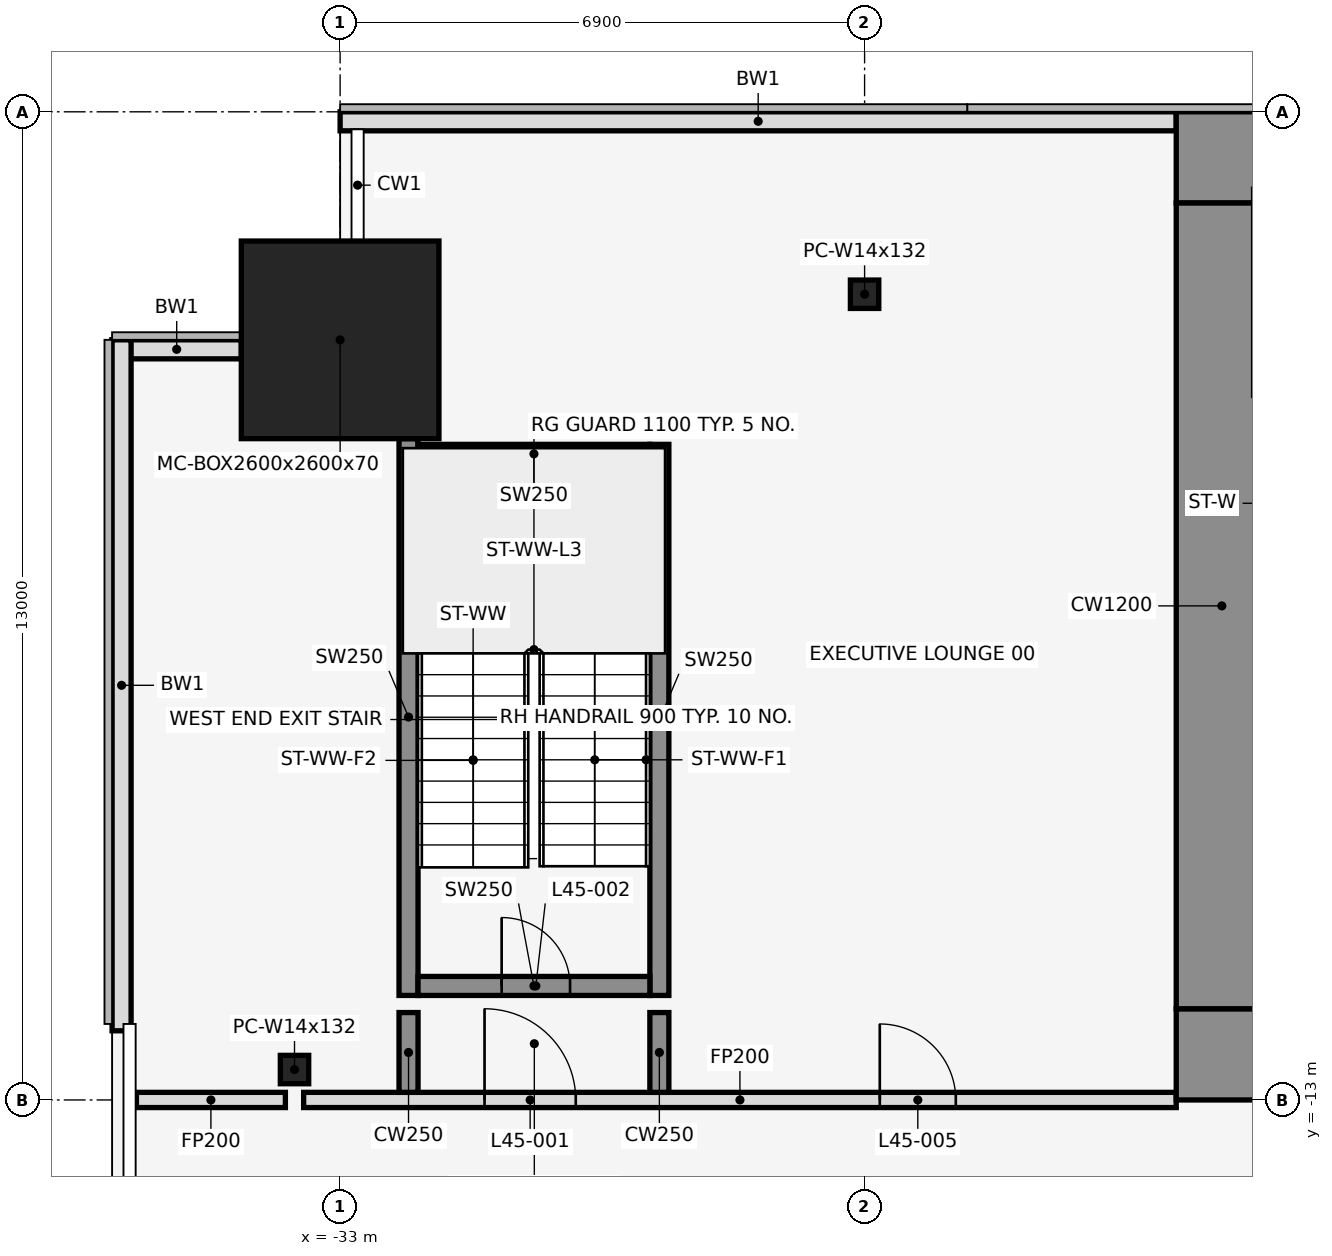
"""IFC4 building model, lengths in metres.
Left out: names, types, materials, properties, quantities, classifications, styles, units other than length and angle.
Written with IfcOpenShell. Run it as: python <this file> out.ifc"""

import sys

from ifc_helpers import new_model, si_unit, direction, frame, frame_2d, origin, origin_2d, place, context, subcontext, project, spatial, rectangle, hollow_rectangle, i_section, extrude, element, fill, save


model = new_model("IFC4")
c1 = context("Model", 3, precision=1e-05, world=origin(), true_north=direction((0.0, 1.0)))
c2 = subcontext(c1, "Body", "Model", "MODEL_VIEW")
j1 = project(units=[si_unit("LENGTHUNIT", "METRE"), si_unit("PLANEANGLEUNIT", "RADIAN")], contexts=[c1])
p1 = place(None, origin())
s1 = spatial("IfcSite", under=j1, at=p1, CompositionType="ELEMENT")
p2 = place(p1, origin())
s2 = spatial("IfcBuilding", under=s1, at=p2, CompositionType="ELEMENT")
p3 = place(p2, frame((0.0, 0.0, 203.2)))
s3 = spatial("IfcBuildingStorey", under=s2, at=p3, CompositionType="ELEMENT", Elevation=203.2)
p4 = place(p3, frame((-33.0, -3.0, 0.0), z_axis=(0.0, 0.0, 1.0), x_axis=(1.0, 0.0, 0.0)))
e1 = element("IfcColumn", 1, at=p4, inside=s3, PredefinedType="COLUMN", context=c2, shape_type="SweptSolid", body=[
    extrude(hollow_rectangle(XDim=2.6, YDim=2.6, WallThickness=0.07, at=origin_2d()), origin(), (0.0, 0.0, 1.0), 4.1),
])
for number, where, z_axis, x_axis in (
    (2, (-26.1, -2.4, 0.0), (0.0, 0.0, 1.0), (1.0, 0.0, 0.0)),
    (3, (-33.6, -12.6, 0.0), (0.0, 0.0, 1.0), (1.0, 0.0, 0.0)),
):
    element("IfcColumn", number, at=place(p3, frame(where, z_axis=z_axis, x_axis=x_axis)), inside=s3, PredefinedType="COLUMN", context=c2, shape_type="SweptSolid", body=[
        extrude(i_section(OverallWidth=0.373, OverallDepth=0.373, WebThickness=0.016, FlangeThickness=0.026, at=origin_2d()), origin(), (0.0, 0.0, 1.0), 4.1),
    ])
p5 = place(p3, frame((-22.0, -0.125, 0.0), z_axis=(0.0, 0.0, 1.0), x_axis=(-1.0, 0.0, 0.0)))
e4 = element("IfcWall", 4, at=p5, inside=s3, PredefinedType="STANDARD", context=c2, shape_type="SweptSolid", body=[
    extrude(rectangle(XDim=11.0, YDim=0.25, at=frame_2d((5.5, 0.0))), origin(), (0.0, 0.0, 1.0), 3.95),
])
p6 = place(p3, frame((-34.3, -3.125, 0.0), z_axis=(0.0, 0.0, 1.0), x_axis=(-1.0, 0.0, 0.0)))
e5 = element("IfcWall", 5, at=p6, inside=s3, PredefinedType="STANDARD", context=c2, shape_type="SweptSolid", body=[
    extrude(rectangle(XDim=1.7, YDim=0.25, at=frame_2d((0.85, 0.0))), origin(), (0.0, 0.0, 1.0), 3.95),
])
p7 = place(p3, frame((-35.875, -3.0, 0.0), z_axis=(0.0, 0.0, 1.0), x_axis=(0.0, -1.0, 0.0)))
e6 = element("IfcWall", 6, at=p7, inside=s3, PredefinedType="STANDARD", context=c2, shape_type="SweptSolid", body=[
    extrude(rectangle(XDim=9.09, YDim=0.25, at=frame_2d((4.545, 0.0))), origin(), (0.0, 0.0, 1.0), 3.95),
])
p8 = place(p3, frame((-32.1, -11.625, 0.0), z_axis=(0.0, 0.0, 1.0), x_axis=(0.0, 1.0, 0.0)))
e7 = element("IfcWall", 7, at=p8, inside=s3, PredefinedType="SHEAR", context=c2, shape_type="SweptSolid", body=[
    extrude(rectangle(XDim=7.325, YDim=0.25, at=frame_2d((3.663, 0.0))), origin(), (0.0, 0.0, 1.0), 4.1),
])
p9 = place(p3, frame((-28.8, -11.625, 0.0), z_axis=(0.0, 0.0, 1.0), x_axis=(0.0, 1.0, 0.0)))
e8 = element("IfcWall", 8, at=p9, inside=s3, PredefinedType="SHEAR", context=c2, shape_type="SweptSolid", body=[
    extrude(rectangle(XDim=7.25, YDim=0.25, at=frame_2d((3.625, 0.0))), origin(), (0.0, 0.0, 1.0), 4.1),
])
p10 = place(p3, frame((-31.975, -11.5, 0.0), z_axis=(0.0, 0.0, 1.0), x_axis=(1.0, 0.0, 0.0)))
e9 = element("IfcWall", 9, at=p10, inside=s3, PredefinedType="SHEAR", context=c2, shape_type="SweptSolid", body=[
    extrude(rectangle(XDim=3.05, YDim=0.25, at=frame_2d((1.525, 0.0))), origin(), (0.0, 0.0, 1.0), 4.1),
])
p11 = place(p10, frame((1.1, 0.0, 0.0)))
e10 = element("IfcOpeningElement", 10, at=p11, cuts=e9, PredefinedType="OPENING", context=c2, shape_type="SweptSolid", body=[
    extrude(rectangle(XDim=0.9, YDim=2.1, at=frame_2d((0.45, 1.05))), frame((0.0, 0.137, 0.0), z_axis=(0.0, -1.0, 0.0), x_axis=(1.0, 0.0, 0.0)), (0.0, 0.0, 1.0), 0.274),
])
p12 = place(p3, frame((-31.975, -4.5, 0.0), z_axis=(0.0, 0.0, 1.0), x_axis=(1.0, 0.0, 0.0)))
e11 = element("IfcWall", 11, at=p12, inside=s3, PredefinedType="SHEAR", context=c2, shape_type="SweptSolid", body=[
    extrude(rectangle(XDim=3.05, YDim=0.25, at=frame_2d((1.525, 0.0))), origin(), (0.0, 0.0, 1.0), 4.1),
])
p13 = place(p3, frame((-35.68, -13.0, 0.0), z_axis=(0.0, 0.0, 1.0), x_axis=(1.0, 0.0, 0.0)))
e12 = element("IfcWall", 12, at=p13, inside=s3, PredefinedType="PARTITIONING", context=c2, shape_type="SweptSolid", body=[
    extrude(rectangle(XDim=1.96, YDim=0.2, at=frame_2d((0.98, 0.0))), origin(), (0.0, 0.0, 1.0), 2.84),
])
p14 = place(p3, frame((-33.48, -13.0, 0.0), z_axis=(0.0, 0.0, 1.0), x_axis=(1.0, 0.0, 0.0)))
e13 = element("IfcWall", 13, at=p14, inside=s3, PredefinedType="PARTITIONING", context=c2, shape_type="SweptSolid", body=[
    extrude(rectangle(XDim=11.48, YDim=0.2, at=frame_2d((5.74, 0.0))), origin(), (0.0, 0.0, 1.0), 2.84),
])
p15 = place(p14, frame((2.38, 0.0, 0.0)))
e14 = element("IfcOpeningElement", 14, at=p15, cuts=e13, PredefinedType="OPENING", context=c2, shape_type="SweptSolid", body=[
    extrude(rectangle(XDim=1.2, YDim=2.1, at=frame_2d((0.6, 1.05))), frame((0.0, 0.112, 0.0), z_axis=(0.0, -1.0, 0.0), x_axis=(1.0, 0.0, 0.0)), (0.0, 0.0, 1.0), 0.224),
])
p16 = place(p14, frame((7.58, 0.0, 0.0)))
e15 = element("IfcOpeningElement", 15, at=p16, cuts=e13, PredefinedType="OPENING", context=c2, shape_type="SweptSolid", body=[
    extrude(rectangle(XDim=1.0, YDim=2.1, at=frame_2d((0.5, 1.05))), frame((0.0, 0.112, 0.0), z_axis=(0.0, -1.0, 0.0), x_axis=(1.0, 0.0, 0.0)), (0.0, 0.0, 1.0), 0.224),
])
for number, where, z_axis, x_axis in (
    (16, (-32.1, -12.9, 0.0), (0.0, 0.0, 1.0), (0.0, 1.0, 0.0)),
    (17, (-28.8, -12.9, 0.0), (0.0, 0.0, 1.0), (0.0, 1.0, 0.0)),
):
    element("IfcWall", number, at=place(p3, frame(where, z_axis=z_axis, x_axis=x_axis)), inside=s3, PredefinedType="SHEAR", context=c2, shape_type="SweptSolid", body=[
        extrude(rectangle(XDim=1.05, YDim=0.25, at=frame_2d((0.525, 0.0))), origin(), (0.0, 0.0, 1.0), 4.1),
    ])
p17 = place(p3, frame((-22.0, -0.6, 0.0), z_axis=(0.0, 0.0, 1.0), x_axis=(1.0, 0.0, 0.0)))
e18 = element("IfcWall", 18, at=p17, inside=s3, PredefinedType="SHEAR", context=c2, shape_type="SweptSolid", body=[
    extrude(rectangle(XDim=44.0, YDim=1.2, at=frame_2d((22.0, 0.0))), origin(), (0.0, 0.0, 1.0), 4.1),
])
p18 = place(p17, frame((18.55, 0.0, 0.0)))
e19 = element("IfcOpeningElement", 19, at=p18, cuts=e18, PredefinedType="OPENING", context=c2, shape_type="SweptSolid", body=[
    extrude(rectangle(XDim=0.9, YDim=2.1, at=frame_2d((0.45, 1.05))), frame((0.0, 0.612, 0.0), z_axis=(0.0, -1.0, 0.0), x_axis=(1.0, 0.0, 0.0)), (0.0, 0.0, 1.0), 1.224),
])
p19 = place(p17, frame((24.55, 0.0, 0.0)))
e20 = element("IfcOpeningElement", 20, at=p19, cuts=e18, PredefinedType="OPENING", context=c2, shape_type="SweptSolid", body=[
    extrude(rectangle(XDim=0.9, YDim=2.1, at=frame_2d((0.45, 1.05))), frame((0.0, 0.612, 0.0), z_axis=(0.0, -1.0, 0.0), x_axis=(1.0, 0.0, 0.0)), (0.0, 0.0, 1.0), 1.224),
])
p20 = place(p3, frame((-22.0, -12.4, 0.0), z_axis=(0.0, 0.0, 1.0), x_axis=(1.0, 0.0, 0.0)))
e21 = element("IfcWall", 21, at=p20, inside=s3, PredefinedType="SHEAR", context=c2, shape_type="SweptSolid", body=[
    extrude(rectangle(XDim=44.0, YDim=1.2, at=frame_2d((22.0, 0.0))), origin(), (0.0, 0.0, 1.0), 4.1),
])
p21 = place(p20, frame((2.2, 0.0, 0.0)))
e22 = element("IfcOpeningElement", 22, at=p21, cuts=e21, PredefinedType="OPENING", context=c2, shape_type="SweptSolid", body=[
    extrude(rectangle(XDim=1.2, YDim=2.1, at=frame_2d((0.6, 1.05))), frame((0.0, 0.612, 0.0), z_axis=(0.0, -1.0, 0.0), x_axis=(1.0, 0.0, 0.0)), (0.0, 0.0, 1.0), 1.224),
])
p22 = place(p20, frame((21.4, 0.0, 0.0)))
e23 = element("IfcOpeningElement", 23, at=p22, cuts=e21, PredefinedType="OPENING", context=c2, shape_type="SweptSolid", body=[
    extrude(rectangle(XDim=1.2, YDim=2.1, at=frame_2d((0.6, 1.05))), frame((0.0, 0.612, 0.0), z_axis=(0.0, -1.0, 0.0), x_axis=(1.0, 0.0, 0.0)), (0.0, 0.0, 1.0), 1.224),
])
p23 = place(p20, frame((40.6, 0.0, 0.0)))
e24 = element("IfcOpeningElement", 24, at=p23, cuts=e21, PredefinedType="OPENING", context=c2, shape_type="SweptSolid", body=[
    extrude(rectangle(XDim=1.2, YDim=2.1, at=frame_2d((0.6, 1.05))), frame((0.0, 0.612, 0.0), z_axis=(0.0, -1.0, 0.0), x_axis=(1.0, 0.0, 0.0)), (0.0, 0.0, 1.0), 1.224),
])
p24 = place(p20, frame((16.0, 0.0, 0.0)))
e25 = element("IfcOpeningElement", 25, at=p24, cuts=e21, PredefinedType="OPENING", context=c2, shape_type="SweptSolid", body=[
    extrude(rectangle(XDim=1.8, YDim=2.1, at=frame_2d((0.9, 1.05))), frame((0.0, 0.612, 0.0), z_axis=(0.0, -1.0, 0.0), x_axis=(1.0, 0.0, 0.0)), (0.0, 0.0, 1.0), 1.224),
])
p25 = place(p20, frame((6.3, 0.0, 0.0)))
e26 = element("IfcOpeningElement", 26, at=p25, cuts=e21, PredefinedType="OPENING", context=c2, shape_type="SweptSolid", body=[
    extrude(rectangle(XDim=1.2, YDim=2.1, at=frame_2d((0.6, 1.05))), frame((0.0, 0.612, 0.0), z_axis=(0.0, -1.0, 0.0), x_axis=(1.0, 0.0, 0.0)), (0.0, 0.0, 1.0), 1.224),
])
p26 = place(p20, frame((26.2, 0.0, 0.0)))
e27 = element("IfcOpeningElement", 27, at=p26, cuts=e21, PredefinedType="OPENING", context=c2, shape_type="SweptSolid", body=[
    extrude(rectangle(XDim=1.8, YDim=2.1, at=frame_2d((0.9, 1.05))), frame((0.0, 0.612, 0.0), z_axis=(0.0, -1.0, 0.0), x_axis=(1.0, 0.0, 0.0)), (0.0, 0.0, 1.0), 1.224),
])
p27 = place(p20, frame((36.5, 0.0, 0.0)))
e28 = element("IfcOpeningElement", 28, at=p27, cuts=e21, PredefinedType="OPENING", context=c2, shape_type="SweptSolid", body=[
    extrude(rectangle(XDim=1.2, YDim=2.1, at=frame_2d((0.6, 1.05))), frame((0.0, 0.612, 0.0), z_axis=(0.0, -1.0, 0.0), x_axis=(1.0, 0.0, 0.0)), (0.0, 0.0, 1.0), 1.224),
])
p28 = place(p3, frame((-21.4, -11.8, 0.0), z_axis=(0.0, 0.0, 1.0), x_axis=(0.0, 1.0, 0.0)))
e29 = element("IfcWall", 29, at=p28, inside=s3, PredefinedType="SHEAR", context=c2, shape_type="SweptSolid", body=[
    extrude(rectangle(XDim=10.6, YDim=1.2, at=frame_2d((5.3, 0.0))), origin(), (0.0, 0.0, 1.0), 4.1),
])
p29 = place(p15, origin())
e30 = element("IfcDoor", 30, at=p29, inside=s3, OperationType="SINGLE_SWING_LEFT", PredefinedType="DOOR", context=c2, shape_type="SweptSolid", body=[
    extrude(rectangle(XDim=1.2, YDim=2.1, at=frame_2d((0.6, 1.05))), frame((0.0, 0.025, 0.0), z_axis=(0.0, -1.0, 0.0), x_axis=(1.0, 0.0, 0.0)), (0.0, 0.0, 1.0), 0.05),
])
fill(e14, e30)
p30 = place(p11, origin())
e31 = element("IfcDoor", 31, at=p30, inside=s3, OperationType="SINGLE_SWING_LEFT", PredefinedType="DOOR", context=c2, shape_type="SweptSolid", body=[
    extrude(rectangle(XDim=0.9, YDim=2.1, at=frame_2d((0.45, 1.05))), frame((0.0, 0.025, 0.0), z_axis=(0.0, -1.0, 0.0), x_axis=(1.0, 0.0, 0.0)), (0.0, 0.0, 1.0), 0.05),
])
fill(e10, e31)
p31 = place(p16, origin())
e32 = element("IfcDoor", 32, at=p31, inside=s3, OperationType="SINGLE_SWING_LEFT", PredefinedType="DOOR", context=c2, shape_type="SweptSolid", body=[
    extrude(rectangle(XDim=1.0, YDim=2.1, at=frame_2d((0.5, 1.05))), frame((0.0, 0.025, 0.0), z_axis=(0.0, -1.0, 0.0), x_axis=(1.0, 0.0, 0.0)), (0.0, 0.0, 1.0), 0.05),
])
fill(e15, e32)
save(model, sys.argv[1])
